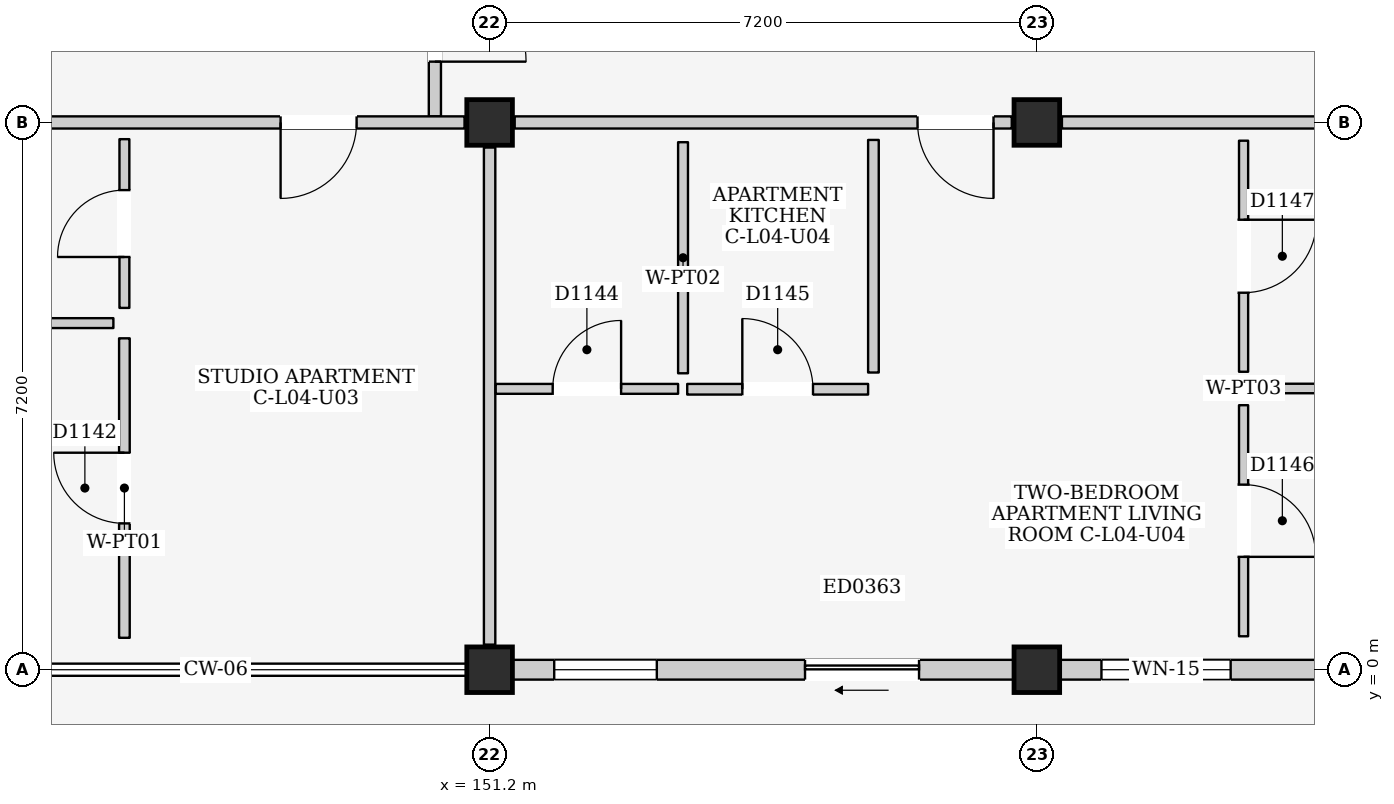
"""IFC4 building model, lengths in metres.
Left out: names, types, materials, properties, quantities, classifications, styles, units other than length and angle.
Written with IfcOpenShell. Run it as: python <this file> out.ifc"""

import sys

from ifc_helpers import new_model, si_unit, direction, frame, frame_2d, origin, origin_2d, place, context, subcontext, project, spatial, rectangle, extrude, element, fill, save


model = new_model("IFC4")
c1 = context("Model", 3, precision=1e-05, world=origin(), true_north=direction((0.0, 1.0)))
c2 = subcontext(c1, "Body", "Model", "MODEL_VIEW")
j1 = project(units=[si_unit("LENGTHUNIT", "METRE"), si_unit("PLANEANGLEUNIT", "RADIAN")], contexts=[c1])
p1 = place(None, origin())
s1 = spatial("IfcSite", under=j1, at=p1, CompositionType="ELEMENT")
p2 = place(p1, origin())
s2 = spatial("IfcBuilding", under=s1, at=p2, CompositionType="ELEMENT")
p3 = place(p2, frame((0.0, 0.0, 15.4)))
s3 = spatial("IfcBuildingStorey", under=s2, at=p3, CompositionType="ELEMENT", Elevation=15.4)
for number, where, z_axis, x_axis in (
    (1, (151.2, 0.0, 0.0), (0.0, 0.0, 1.0), (1.0, 0.0, 0.0)),
    (2, (151.2, 7.2, 0.0), (0.0, 0.0, 1.0), (1.0, 0.0, 0.0)),
    (3, (158.4, 0.0, 0.0), (0.0, 0.0, 1.0), (1.0, 0.0, 0.0)),
    (4, (158.4, 7.2, 0.0), (0.0, 0.0, 1.0), (1.0, 0.0, 0.0)),
):
    element("IfcColumn", number, at=place(p3, frame(where, z_axis=z_axis, x_axis=x_axis)), inside=s3, PredefinedType="COLUMN", context=c2, shape_type="SweptSolid", body=[
        extrude(rectangle(XDim=0.6, YDim=0.6, at=origin_2d()), origin(), (0.0, 0.0, 1.0), 3.2),
    ])
p4 = place(p3, frame((151.5, 0.0, 0.0), z_axis=(0.0, 0.0, 1.0), x_axis=(1.0, 0.0, 0.0)))
e5 = element("IfcWall", 5, at=p4, inside=s3, PredefinedType="ELEMENTEDWALL", context=c2, shape_type="SweptSolid", body=[
    extrude(rectangle(XDim=6.6, YDim=0.26, at=frame_2d((3.3, 0.0))), origin(), (0.0, 0.0, 1.0), 2.43),
])
p5 = place(p4, frame((3.85, 0.0, 0.0)))
e6 = element("IfcOpeningElement", 6, at=p5, cuts=e5, PredefinedType="OPENING", context=c2, shape_type="SweptSolid", body=[
    extrude(rectangle(XDim=1.5, YDim=2.12, at=frame_2d((0.75, 1.06))), frame((0.0, 0.145, 0.0), z_axis=(0.0, -1.0, 0.0), x_axis=(1.0, 0.0, 0.0)), (0.0, 0.0, 1.0), 0.29),
])
p6 = place(p4, frame((0.55, 0.0, 0.81)))
e7 = element("IfcOpeningElement", 7, at=p6, cuts=e5, PredefinedType="OPENING", context=c2, shape_type="SweptSolid", body=[
    extrude(rectangle(XDim=1.35, YDim=1.5, at=frame_2d((0.675, 0.75))), frame((0.0, 0.145, 0.0), z_axis=(0.0, -1.0, 0.0), x_axis=(1.0, 0.0, 0.0)), (0.0, 0.0, 1.0), 0.29),
])
p7 = place(p3, frame((158.7, 0.0, 0.0), z_axis=(0.0, 0.0, 1.0), x_axis=(1.0, 0.0, 0.0)))
e8 = element("IfcWall", 8, at=p7, inside=s3, PredefinedType="ELEMENTEDWALL", context=c2, shape_type="SweptSolid", body=[
    extrude(rectangle(XDim=6.6, YDim=0.26, at=frame_2d((3.3, 0.0))), origin(), (0.0, 0.0, 1.0), 2.43),
])
p8 = place(p7, frame((3.85, 0.0, 0.0)))
e9 = element("IfcOpeningElement", 9, at=p8, cuts=e8, PredefinedType="OPENING", context=c2, shape_type="SweptSolid", body=[
    extrude(rectangle(XDim=2.4, YDim=2.12, at=frame_2d((1.2, 1.06))), frame((0.0, 0.145, 0.0), z_axis=(0.0, -1.0, 0.0), x_axis=(1.0, 0.0, 0.0)), (0.0, 0.0, 1.0), 0.29),
])
p9 = place(p7, frame((0.55, 0.0, 0.86)))
e10 = element("IfcOpeningElement", 10, at=p9, cuts=e8, PredefinedType="OPENING", context=c2, shape_type="SweptSolid", body=[
    extrude(rectangle(XDim=1.7, YDim=1.45, at=frame_2d((0.85, 0.725))), frame((0.0, 0.145, 0.0), z_axis=(0.0, -1.0, 0.0), x_axis=(1.0, 0.0, 0.0)), (0.0, 0.0, 1.0), 0.29),
])
p10 = place(p3, frame((150.48, 7.28, 0.0), z_axis=(0.0, 0.0, 1.0), x_axis=(0.0, 1.0, 0.0)))
e11 = element("IfcWall", 11, at=p10, inside=s3, PredefinedType="PARTITIONING", context=c2, shape_type="SweptSolid", body=[
    extrude(rectangle(XDim=4.32, YDim=0.16, at=frame_2d((2.16, 0.0))), origin(), (0.0, 0.0, 1.0), 2.95),
])
p11 = place(p10, frame((0.72, 0.0, 0.0)))
e12 = element("IfcOpeningElement", 12, at=p11, cuts=e11, PredefinedType="OPENING", context=c2, shape_type="SweptSolid", body=[
    extrude(rectangle(XDim=1.2, YDim=2.2, at=frame_2d((0.6, 1.1))), frame((0.0, 0.095, 0.0), z_axis=(0.0, -1.0, 0.0), x_axis=(1.0, 0.0, 0.0)), (0.0, 0.0, 1.0), 0.19),
])
p12 = place(p3, frame((144.33, 7.2, 0.0), z_axis=(0.0, 0.0, 1.0), x_axis=(1.0, 0.0, 0.0)))
e13 = element("IfcWall", 13, at=p12, inside=s3, PredefinedType="PARTITIONING", context=c2, shape_type="SweptSolid", body=[
    extrude(rectangle(XDim=6.54, YDim=0.16, at=frame_2d((3.27, 0.0))), origin(), (0.0, 0.0, 1.0), 2.335),
])
p13 = place(p12, frame((4.12, 0.0, 0.0)))
e14 = element("IfcOpeningElement", 14, at=p13, cuts=e13, PredefinedType="OPENING", context=c2, shape_type="SweptSolid", body=[
    extrude(rectangle(XDim=1.0, YDim=2.15, at=frame_2d((0.5, 1.075))), frame((0.0, 0.095, 0.0), z_axis=(0.0, -1.0, 0.0), x_axis=(1.0, 0.0, 0.0)), (0.0, 0.0, 1.0), 0.19),
])
p14 = place(p3, frame((151.2, 0.33, 0.0), z_axis=(0.0, 0.0, 1.0), x_axis=(0.0, 1.0, 0.0)))
e15 = element("IfcWall", 15, at=p14, inside=s3, PredefinedType="PARTITIONING", context=c2, shape_type="SweptSolid", body=[
    extrude(rectangle(XDim=6.54, YDim=0.15, at=frame_2d((3.27, 0.0))), origin(), (0.0, 0.0, 1.0), 2.385),
])
p15 = place(p3, frame((144.2, 4.56, 0.0), z_axis=(0.0, 0.0, 1.0), x_axis=(1.0, 0.0, 0.0)))
e16 = element("IfcWall", 16, at=p15, inside=s3, PredefinedType="PARTITIONING", context=c2, shape_type="SweptSolid", body=[
    extrude(rectangle(XDim=2.05, YDim=0.13, at=frame_2d((1.025, 0.0))), origin(), (0.0, 0.0, 1.0), 2.95),
])
p16 = place(p3, frame((146.395, 4.76, 0.0), z_axis=(0.0, 0.0, 1.0), x_axis=(0.0, 1.0, 0.0)))
e17 = element("IfcWall", 17, at=p16, inside=s3, PredefinedType="PARTITIONING", context=c2, shape_type="SweptSolid", body=[
    extrude(rectangle(XDim=2.22, YDim=0.13, at=frame_2d((1.11, 0.0))), origin(), (0.0, 0.0, 1.0), 2.95),
])
p17 = place(p16, frame((0.67, 0.0, 0.0)))
e18 = element("IfcOpeningElement", 18, at=p17, cuts=e17, PredefinedType="OPENING", context=c2, shape_type="SweptSolid", body=[
    extrude(rectangle(XDim=0.88, YDim=2.1, at=frame_2d((0.44, 1.05))), frame((0.0, 0.08, 0.0), z_axis=(0.0, -1.0, 0.0), x_axis=(1.0, 0.0, 0.0)), (0.0, 0.0, 1.0), 0.16),
])
p18 = place(p3, frame((146.395, 0.42, 0.0), z_axis=(0.0, 0.0, 1.0), x_axis=(0.0, 1.0, 0.0)))
e19 = element("IfcWall", 19, at=p18, inside=s3, PredefinedType="PARTITIONING", context=c2, shape_type="SweptSolid", body=[
    extrude(rectangle(XDim=3.94, YDim=0.14, at=frame_2d((1.97, 0.0))), origin(), (0.0, 0.0, 1.0), 2.95),
])
p19 = place(p18, frame((1.505, 0.0, 0.0)))
e20 = element("IfcOpeningElement", 20, at=p19, cuts=e19, PredefinedType="OPENING", context=c2, shape_type="SweptSolid", body=[
    extrude(rectangle(XDim=0.93, YDim=2.14, at=frame_2d((0.465, 1.07))), frame((0.0, 0.085, 0.0), z_axis=(0.0, -1.0, 0.0), x_axis=(1.0, 0.0, 0.0)), (0.0, 0.0, 1.0), 0.17),
])
p20 = place(p3, frame((151.53, 7.2, 0.0), z_axis=(0.0, 0.0, 1.0), x_axis=(1.0, 0.0, 0.0)))
e21 = element("IfcWall", 21, at=p20, inside=s3, PredefinedType="PARTITIONING", context=c2, shape_type="SweptSolid", body=[
    extrude(rectangle(XDim=6.54, YDim=0.16, at=frame_2d((3.27, 0.0))), origin(), (0.0, 0.0, 1.0), 2.335),
])
p21 = place(p20, frame((5.3, 0.0, 0.0)))
e22 = element("IfcOpeningElement", 22, at=p21, cuts=e21, PredefinedType="OPENING", context=c2, shape_type="SweptSolid", body=[
    extrude(rectangle(XDim=1.0, YDim=2.15, at=frame_2d((0.5, 1.075))), frame((0.0, 0.095, 0.0), z_axis=(0.0, -1.0, 0.0), x_axis=(1.0, 0.0, 0.0)), (0.0, 0.0, 1.0), 0.19),
])
p22 = place(p3, frame((158.73, 7.2, 0.0), z_axis=(0.0, 0.0, 1.0), x_axis=(1.0, 0.0, 0.0)))
e23 = element("IfcWall", 23, at=p22, inside=s3, PredefinedType="PARTITIONING", context=c2, shape_type="SweptSolid", body=[
    extrude(rectangle(XDim=6.54, YDim=0.16, at=frame_2d((3.27, 0.0))), origin(), (0.0, 0.0, 1.0), 2.335),
])
p23 = place(p3, frame((151.28, 3.695, 0.0), z_axis=(0.0, 0.0, 1.0), x_axis=(1.0, 0.0, 0.0)))
e24 = element("IfcWall", 24, at=p23, inside=s3, PredefinedType="PARTITIONING", context=c2, shape_type="SweptSolid", body=[
    extrude(rectangle(XDim=2.4, YDim=0.13, at=frame_2d((1.2, 0.0))), origin(), (0.0, 0.0, 1.0), 2.95),
])
p24 = place(p23, frame((0.75, 0.0, 0.0)))
e25 = element("IfcOpeningElement", 25, at=p24, cuts=e24, PredefinedType="OPENING", context=c2, shape_type="SweptSolid", body=[
    extrude(rectangle(XDim=0.9, YDim=2.1, at=frame_2d((0.45, 1.05))), frame((0.0, 0.08, 0.0), z_axis=(0.0, -1.0, 0.0), x_axis=(1.0, 0.0, 0.0)), (0.0, 0.0, 1.0), 0.16),
])
p25 = place(p3, frame((153.745, 3.9, 0.0), z_axis=(0.0, 0.0, 1.0), x_axis=(0.0, 1.0, 0.0)))
e26 = element("IfcWall", 26, at=p25, inside=s3, PredefinedType="PARTITIONING", context=c2, shape_type="SweptSolid", body=[
    extrude(rectangle(XDim=3.04, YDim=0.13, at=frame_2d((1.52, 0.0))), origin(), (0.0, 0.0, 1.0), 2.95),
])
p26 = place(p3, frame((153.8, 3.69, 0.0), z_axis=(0.0, 0.0, 1.0), x_axis=(1.0, 0.0, 0.0)))
e27 = element("IfcWall", 27, at=p26, inside=s3, PredefinedType="PARTITIONING", context=c2, shape_type="SweptSolid", body=[
    extrude(rectangle(XDim=2.38, YDim=0.14, at=frame_2d((1.19, 0.0))), origin(), (0.0, 0.0, 1.0), 2.95),
])
p27 = place(p26, frame((0.725, 0.0, 0.0)))
e28 = element("IfcOpeningElement", 28, at=p27, cuts=e27, PredefinedType="OPENING", context=c2, shape_type="SweptSolid", body=[
    extrude(rectangle(XDim=0.93, YDim=2.14, at=frame_2d((0.465, 1.07))), frame((0.0, 0.085, 0.0), z_axis=(0.0, -1.0, 0.0), x_axis=(1.0, 0.0, 0.0)), (0.0, 0.0, 1.0), 0.17),
])
p28 = place(p3, frame((156.25, 3.91, 0.0), z_axis=(0.0, 0.0, 1.0), x_axis=(0.0, 1.0, 0.0)))
e29 = element("IfcWall", 29, at=p28, inside=s3, PredefinedType="PARTITIONING", context=c2, shape_type="SweptSolid", body=[
    extrude(rectangle(XDim=3.06, YDim=0.14, at=frame_2d((1.53, 0.0))), origin(), (0.0, 0.0, 1.0), 2.95),
])
p29 = place(p3, frame((161.12, 0.44, 0.0), z_axis=(0.0, 0.0, 1.0), x_axis=(0.0, 1.0, 0.0)))
e30 = element("IfcWall", 30, at=p29, inside=s3, PredefinedType="PARTITIONING", context=c2, shape_type="SweptSolid", body=[
    extrude(rectangle(XDim=3.04, YDim=0.12, at=frame_2d((1.52, 0.0))), origin(), (0.0, 0.0, 1.0), 2.95),
])
p30 = place(p29, frame((1.045, 0.0, 0.0)))
e31 = element("IfcOpeningElement", 31, at=p30, cuts=e30, PredefinedType="OPENING", context=c2, shape_type="SweptSolid", body=[
    extrude(rectangle(XDim=0.95, YDim=2.15, at=frame_2d((0.475, 1.075))), frame((0.0, 0.075, 0.0), z_axis=(0.0, -1.0, 0.0), x_axis=(1.0, 0.0, 0.0)), (0.0, 0.0, 1.0), 0.15),
])
p31 = place(p3, frame((161.32, 3.7, 0.0), z_axis=(0.0, 0.0, 1.0), x_axis=(1.0, 0.0, 0.0)))
e32 = element("IfcWall", 32, at=p31, inside=s3, PredefinedType="PARTITIONING", context=c2, shape_type="SweptSolid", body=[
    extrude(rectangle(XDim=4.06, YDim=0.125, at=frame_2d((2.03, 0.0))), origin(), (0.0, 0.0, 1.0), 2.95),
])
p32 = place(p3, frame((161.12, 3.92, 0.0), z_axis=(0.0, 0.0, 1.0), x_axis=(0.0, 1.0, 0.0)))
e33 = element("IfcWall", 33, at=p32, inside=s3, PredefinedType="PARTITIONING", context=c2, shape_type="SweptSolid", body=[
    extrude(rectangle(XDim=3.04, YDim=0.12, at=frame_2d((1.52, 0.0))), origin(), (0.0, 0.0, 1.0), 2.95),
])
p33 = place(p32, frame((1.04, 0.0, 0.0)))
e34 = element("IfcOpeningElement", 34, at=p33, cuts=e33, PredefinedType="OPENING", context=c2, shape_type="SweptSolid", body=[
    extrude(rectangle(XDim=0.96, YDim=2.15, at=frame_2d((0.48, 1.075))), frame((0.0, 0.075, 0.0), z_axis=(0.0, -1.0, 0.0), x_axis=(1.0, 0.0, 0.0)), (0.0, 0.0, 1.0), 0.15),
])
p34 = place(p5, frame((1.5, 0.0, 0.0), z_axis=(0.0, 0.0, 1.0), x_axis=(-1.0, 0.0, 0.0)))
e35 = element("IfcDoor", 35, at=p34, inside=s3, OperationType="SLIDING_TO_LEFT", PredefinedType="DOOR", context=c2, shape_type="SweptSolid", body=[
    extrude(rectangle(XDim=1.5, YDim=2.12, at=frame_2d((0.75, 1.06))), frame((0.0, 0.025, 0.0), z_axis=(0.0, -1.0, 0.0), x_axis=(1.0, 0.0, 0.0)), (0.0, 0.0, 1.0), 0.05),
])
fill(e6, e35)
p35 = place(p6, origin())
e36 = element("IfcWindow", 36, at=p35, inside=s3, PartitioningType="SINGLE_PANEL", PredefinedType="WINDOW", context=c2, shape_type="SweptSolid", body=[
    extrude(rectangle(XDim=1.35, YDim=1.5, at=frame_2d((0.675, 0.75))), frame((0.0, 0.03, 0.0), z_axis=(0.0, -1.0, 0.0), x_axis=(1.0, 0.0, 0.0)), (0.0, 0.0, 1.0), 0.06),
])
fill(e7, e36)
p36 = place(p9, origin())
e37 = element("IfcWindow", 37, at=p36, inside=s3, PartitioningType="DOUBLE_PANEL_VERTICAL", PredefinedType="WINDOW", context=c2, shape_type="SweptSolid", body=[
    extrude(rectangle(XDim=1.7, YDim=1.45, at=frame_2d((0.85, 0.725))), frame((0.0, 0.03, 0.0), z_axis=(0.0, -1.0, 0.0), x_axis=(1.0, 0.0, 0.0)), (0.0, 0.0, 1.0), 0.06),
])
fill(e10, e37)
p37 = place(p11, frame((1.2, 0.0, 0.0), z_axis=(0.0, 0.0, 1.0), x_axis=(-1.0, 0.0, 0.0)))
e38 = element("IfcDoor", 38, at=p37, inside=s3, OperationType="SINGLE_SWING_RIGHT", PredefinedType="DOOR", context=c2, shape_type="SweptSolid", body=[
    extrude(rectangle(XDim=1.2, YDim=2.2, at=frame_2d((0.6, 1.1))), frame((0.0, 0.025, 0.0), z_axis=(0.0, -1.0, 0.0), x_axis=(1.0, 0.0, 0.0)), (0.0, 0.0, 1.0), 0.05),
])
fill(e12, e38)
p38 = place(p13, frame((1.0, 0.0, 0.0), z_axis=(0.0, 0.0, 1.0), x_axis=(-1.0, 0.0, 0.0)))
e39 = element("IfcDoor", 39, at=p38, inside=s3, OperationType="SINGLE_SWING_RIGHT", PredefinedType="DOOR", context=c2, shape_type="SweptSolid", body=[
    extrude(rectangle(XDim=1.0, YDim=2.15, at=frame_2d((0.5, 1.075))), frame((0.0, 0.025, 0.0), z_axis=(0.0, -1.0, 0.0), x_axis=(1.0, 0.0, 0.0)), (0.0, 0.0, 1.0), 0.05),
])
fill(e14, e39)
p39 = place(p17, origin())
e40 = element("IfcDoor", 40, at=p39, inside=s3, OperationType="SINGLE_SWING_LEFT", PredefinedType="DOOR", context=c2, shape_type="SweptSolid", body=[
    extrude(rectangle(XDim=0.88, YDim=2.1, at=frame_2d((0.44, 1.05))), frame((0.0, 0.025, 0.0), z_axis=(0.0, -1.0, 0.0), x_axis=(1.0, 0.0, 0.0)), (0.0, 0.0, 1.0), 0.05),
])
fill(e18, e40)
p40 = place(p19, origin())
e41 = element("IfcDoor", 41, at=p40, inside=s3, OperationType="SINGLE_SWING_RIGHT", PredefinedType="DOOR", context=c2, shape_type="SweptSolid", body=[
    extrude(rectangle(XDim=0.93, YDim=2.14, at=frame_2d((0.465, 1.07))), frame((0.0, 0.025, 0.0), z_axis=(0.0, -1.0, 0.0), x_axis=(1.0, 0.0, 0.0)), (0.0, 0.0, 1.0), 0.05),
])
fill(e20, e41)
p41 = place(p21, frame((1.0, 0.0, 0.0), z_axis=(0.0, 0.0, 1.0), x_axis=(-1.0, 0.0, 0.0)))
e42 = element("IfcDoor", 42, at=p41, inside=s3, OperationType="SINGLE_SWING_LEFT", PredefinedType="DOOR", context=c2, shape_type="SweptSolid", body=[
    extrude(rectangle(XDim=1.0, YDim=2.15, at=frame_2d((0.5, 1.075))), frame((0.0, 0.025, 0.0), z_axis=(0.0, -1.0, 0.0), x_axis=(1.0, 0.0, 0.0)), (0.0, 0.0, 1.0), 0.05),
])
fill(e22, e42)
p42 = place(p24, origin())
e43 = element("IfcDoor", 43, at=p42, inside=s3, OperationType="SINGLE_SWING_RIGHT", PredefinedType="DOOR", context=c2, shape_type="SweptSolid", body=[
    extrude(rectangle(XDim=0.9, YDim=2.1, at=frame_2d((0.45, 1.05))), frame((0.0, 0.025, 0.0), z_axis=(0.0, -1.0, 0.0), x_axis=(1.0, 0.0, 0.0)), (0.0, 0.0, 1.0), 0.05),
])
fill(e25, e43)
p43 = place(p27, origin())
e44 = element("IfcDoor", 44, at=p43, inside=s3, OperationType="SINGLE_SWING_LEFT", PredefinedType="DOOR", context=c2, shape_type="SweptSolid", body=[
    extrude(rectangle(XDim=0.93, YDim=2.14, at=frame_2d((0.465, 1.07))), frame((0.0, 0.025, 0.0), z_axis=(0.0, -1.0, 0.0), x_axis=(1.0, 0.0, 0.0)), (0.0, 0.0, 1.0), 0.05),
])
fill(e28, e44)
p44 = place(p30, frame((0.95, 0.0, 0.0), z_axis=(0.0, 0.0, 1.0), x_axis=(-1.0, 0.0, 0.0)))
e45 = element("IfcDoor", 45, at=p44, inside=s3, OperationType="SINGLE_SWING_RIGHT", PredefinedType="DOOR", context=c2, shape_type="SweptSolid", body=[
    extrude(rectangle(XDim=0.95, YDim=2.15, at=frame_2d((0.475, 1.075))), frame((0.0, 0.025, 0.0), z_axis=(0.0, -1.0, 0.0), x_axis=(1.0, 0.0, 0.0)), (0.0, 0.0, 1.0), 0.05),
])
fill(e31, e45)
p45 = place(p33, frame((0.96, 0.0, 0.0), z_axis=(0.0, 0.0, 1.0), x_axis=(-1.0, 0.0, 0.0)))
e46 = element("IfcDoor", 46, at=p45, inside=s3, OperationType="SINGLE_SWING_LEFT", PredefinedType="DOOR", context=c2, shape_type="SweptSolid", body=[
    extrude(rectangle(XDim=0.96, YDim=2.15, at=frame_2d((0.48, 1.075))), frame((0.0, 0.025, 0.0), z_axis=(0.0, -1.0, 0.0), x_axis=(1.0, 0.0, 0.0)), (0.0, 0.0, 1.0), 0.05),
])
fill(e34, e46)
save(model, sys.argv[1])
